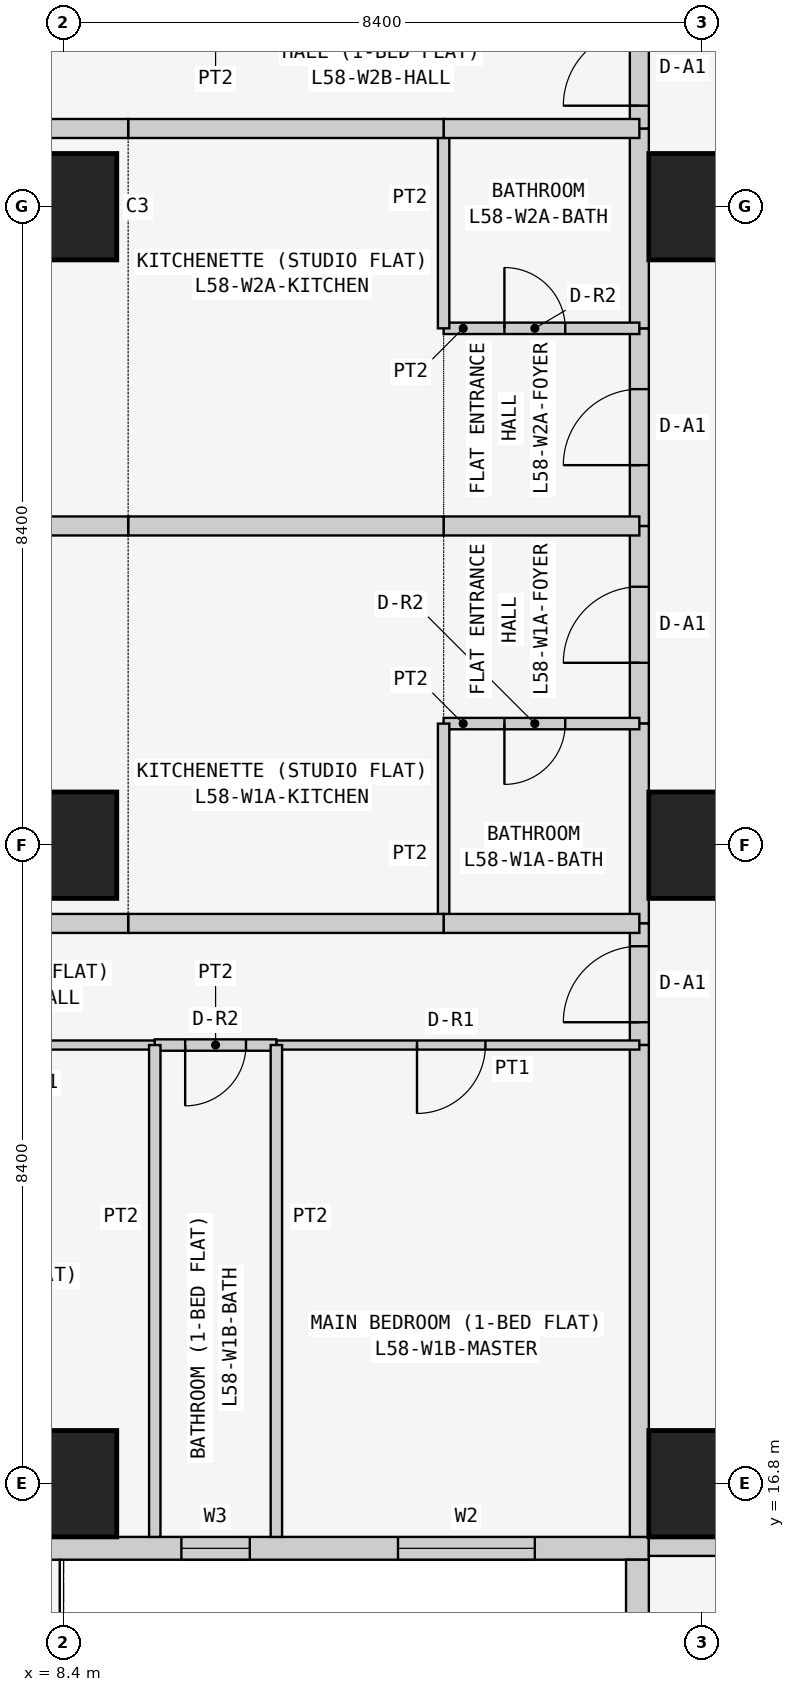
"""IFC4 building model, lengths in metres.
Left out: names, types, materials, properties, quantities, classifications, styles, units other than length and angle.
Written with IfcOpenShell. Run it as: python <this file> out.ifc"""

import sys

from ifc_helpers import new_model, si_unit, direction, frame, frame_2d, origin, origin_2d, place, context, subcontext, project, spatial, rectangle, extrude, element, fill, save


model = new_model("IFC4")
c1 = context("Model", 3, precision=1e-05, world=origin(), true_north=direction((0.0, 1.0)))
c2 = subcontext(c1, "Body", "Model", "MODEL_VIEW")
j1 = project(units=[si_unit("LENGTHUNIT", "METRE"), si_unit("PLANEANGLEUNIT", "RADIAN")], contexts=[c1])
p1 = place(None, origin())
s1 = spatial("IfcSite", under=j1, at=p1, CompositionType="ELEMENT")
p2 = place(p1, origin())
s2 = spatial("IfcBuilding", under=s1, at=p2, CompositionType="ELEMENT")
p3 = place(p2, frame((0.0, 0.0, 222.9)))
s3 = spatial("IfcBuildingStorey", under=s2, at=p3, CompositionType="ELEMENT", Elevation=222.9)
for number, where, z_axis, x_axis in (
    (1, (8.4, 16.8, 0.0), (0.0, 0.0, 1.0), (1.0, 0.0, 0.0)),
    (2, (8.4, 25.2, 0.0), (0.0, 0.0, 1.0), (1.0, 0.0, 0.0)),
    (3, (8.4, 33.6, 0.0), (0.0, 0.0, 1.0), (1.0, 0.0, 0.0)),
    (4, (16.8, 16.8, 0.0), (0.0, 0.0, 1.0), (1.0, 0.0, 0.0)),
    (5, (16.8, 25.2, 0.0), (0.0, 0.0, 1.0), (1.0, 0.0, 0.0)),
    (6, (16.8, 33.6, 0.0), (0.0, 0.0, 1.0), (1.0, 0.0, 0.0)),
):
    element("IfcColumn", number, at=place(p3, frame(where, z_axis=z_axis, x_axis=x_axis)), inside=s3, PredefinedType="COLUMN", context=c2, shape_type="SweptSolid", body=[
        extrude(rectangle(XDim=1.4, YDim=1.4, at=origin_2d()), origin(), (0.0, 0.0, 1.0), 3.6),
    ])
p4 = place(p3, frame((0.4, 15.95, 0.0), z_axis=(0.0, 0.0, 1.0), x_axis=(1.0, 0.0, 0.0)))
e7 = element("IfcWall", 7, at=p4, inside=s3, PredefinedType="SOLIDWALL", context=c2, shape_type="SweptSolid", body=[
    extrude(rectangle(XDim=15.7, YDim=0.3, at=frame_2d((7.85, 0.0))), origin(), (0.0, 0.0, 1.0), 3.45),
])
p5 = place(p4, frame((12.4, 0.0, 0.9)))
e8 = element("IfcOpeningElement", 8, at=p5, cuts=e7, PredefinedType="OPENING", context=c2, shape_type="SweptSolid", body=[
    extrude(rectangle(XDim=1.8, YDim=1.5, at=frame_2d((0.9, 0.75))), frame((0.0, 0.16, 0.0), z_axis=(0.0, -1.0, 0.0), x_axis=(1.0, 0.0, 0.0)), (0.0, 0.0, 1.0), 0.32),
])
p6 = place(p4, frame((9.55, 0.0, 1.5)))
e9 = element("IfcOpeningElement", 9, at=p6, cuts=e7, PredefinedType="OPENING", context=c2, shape_type="SweptSolid", body=[
    extrude(rectangle(XDim=0.9, YDim=0.7, at=frame_2d((0.45, 0.35))), frame((0.0, 0.16, 0.0), z_axis=(0.0, -1.0, 0.0), x_axis=(1.0, 0.0, 0.0)), (0.0, 0.0, 1.0), 0.32),
])
p7 = place(p4, frame((5.1, 0.0, 0.9)))
e10 = element("IfcOpeningElement", 10, at=p7, cuts=e7, PredefinedType="OPENING", context=c2, shape_type="SweptSolid", body=[
    extrude(rectangle(XDim=1.8, YDim=1.5, at=frame_2d((0.9, 0.75))), frame((0.0, 0.16, 0.0), z_axis=(0.0, -1.0, 0.0), x_axis=(1.0, 0.0, 0.0)), (0.0, 0.0, 1.0), 0.32),
])
p8 = place(p4, frame((2.0, 0.0, 0.0)))
e11 = element("IfcOpeningElement", 11, at=p8, cuts=e7, PredefinedType="OPENING", context=c2, shape_type="SweptSolid", body=[
    extrude(rectangle(XDim=0.9, YDim=2.4, at=frame_2d((0.45, 1.2))), frame((0.0, 0.16, 0.0), z_axis=(0.0, -1.0, 0.0), x_axis=(1.0, 0.0, 0.0)), (0.0, 0.0, 1.0), 0.32),
])
p9 = place(p4, frame((0.7, 0.0, 0.9)))
e12 = element("IfcOpeningElement", 12, at=p9, cuts=e7, PredefinedType="OPENING", context=c2, shape_type="SweptSolid", body=[
    extrude(rectangle(XDim=1.2, YDim=1.5, at=frame_2d((0.6, 0.75))), frame((0.0, 0.16, 0.0), z_axis=(0.0, -1.0, 0.0), x_axis=(1.0, 0.0, 0.0)), (0.0, 0.0, 1.0), 0.32),
])
p10 = place(p3, frame((15.95, 15.8, 0.0), z_axis=(0.0, 0.0, 1.0), x_axis=(0.0, -1.0, 0.0)))
e13 = element("IfcWall", 13, at=p10, inside=s3, PredefinedType="SOLIDWALL", context=c2, shape_type="SweptSolid", body=[
    extrude(rectangle(XDim=7.0, YDim=0.3, at=frame_2d((3.5, 0.0))), origin(), (0.0, 0.0, 1.0), 3.45),
])
p11 = place(p10, frame((1.5, 0.0, 0.9)))
e14 = element("IfcOpeningElement", 14, at=p11, cuts=e13, PredefinedType="OPENING", context=c2, shape_type="SweptSolid", body=[
    extrude(rectangle(XDim=2.4, YDim=1.5, at=frame_2d((1.2, 0.75))), frame((0.0, 0.16, 0.0), z_axis=(0.0, -1.0, 0.0), x_axis=(1.0, 0.0, 0.0)), (0.0, 0.0, 1.0), 0.32),
])
p12 = place(p10, frame((5.05, 0.0, 0.9)))
e15 = element("IfcOpeningElement", 15, at=p12, cuts=e13, PredefinedType="OPENING", context=c2, shape_type="SweptSolid", body=[
    extrude(rectangle(XDim=1.2, YDim=1.5, at=frame_2d((0.6, 0.75))), frame((0.0, 0.16, 0.0), z_axis=(0.0, -1.0, 0.0), x_axis=(1.0, 0.0, 0.0)), (0.0, 0.0, 1.0), 0.32),
])
p13 = place(p3, frame((22.971, 15.975, 0.0), z_axis=(0.0, 0.0, 1.0), x_axis=(-1.0, 0.0, 0.0)))
e16 = element("IfcWall", 16, at=p13, inside=s3, PredefinedType="PARTITIONING", context=c2, shape_type="SweptSolid", body=[
    extrude(rectangle(XDim=6.871, YDim=0.25, at=frame_2d((3.436, 0.0))), origin(), (0.0, 0.0, 1.0), 3.45),
])
p14 = place(p3, frame((15.975, 26.8, 0.0), z_axis=(0.0, 0.0, 1.0), x_axis=(0.0, 1.0, 0.0)))
e17 = element("IfcWall", 17, at=p14, inside=s3, PredefinedType="PARTITIONING", context=c2, shape_type="SweptSolid", body=[
    extrude(rectangle(XDim=2.6, YDim=0.25, at=frame_2d((1.3, 0.0))), origin(), (0.0, 0.0, 1.0), 3.45),
])
p15 = place(p14, frame((0.8, 0.0, 0.0)))
e18 = element("IfcOpeningElement", 18, at=p15, cuts=e17, PredefinedType="OPENING", context=c2, shape_type="SweptSolid", body=[
    extrude(rectangle(XDim=1.0, YDim=2.1, at=frame_2d((0.5, 1.05))), frame((0.0, 0.135, 0.0), z_axis=(0.0, -1.0, 0.0), x_axis=(1.0, 0.0, 0.0)), (0.0, 0.0, 1.0), 0.27),
])
p16 = place(p3, frame((15.975, 24.171, 0.0), z_axis=(0.0, 0.0, 1.0), x_axis=(0.0, 1.0, 0.0)))
e19 = element("IfcWall", 19, at=p16, inside=s3, PredefinedType="PARTITIONING", context=c2, shape_type="SweptSolid", body=[
    extrude(rectangle(XDim=2.629, YDim=0.25, at=frame_2d((1.314, 0.0))), origin(), (0.0, 0.0, 1.0), 3.45),
])
p17 = place(p3, frame((15.975, 22.571, 0.0), z_axis=(0.0, 0.0, 1.0), x_axis=(0.0, 1.0, 0.0)))
e20 = element("IfcWall", 20, at=p17, inside=s3, PredefinedType="PARTITIONING", context=c2, shape_type="SweptSolid", body=[
    extrude(rectangle(XDim=1.6, YDim=0.25, at=frame_2d((0.8, 0.0))), origin(), (0.0, 0.0, 1.0), 3.45),
])
p18 = place(p17, frame((0.3, 0.0, 0.0)))
e21 = element("IfcOpeningElement", 21, at=p18, cuts=e20, PredefinedType="OPENING", context=c2, shape_type="SweptSolid", body=[
    extrude(rectangle(XDim=1.0, YDim=2.1, at=frame_2d((0.5, 1.05))), frame((0.0, 0.135, 0.0), z_axis=(0.0, -1.0, 0.0), x_axis=(1.0, 0.0, 0.0)), (0.0, 0.0, 1.0), 0.27),
])
p19 = place(p3, frame((15.975, 16.1, 0.0), z_axis=(0.0, 0.0, 1.0), x_axis=(0.0, 1.0, 0.0)))
e22 = element("IfcWall", 22, at=p19, inside=s3, PredefinedType="PARTITIONING", context=c2, shape_type="SweptSolid", body=[
    extrude(rectangle(XDim=6.471, YDim=0.25, at=frame_2d((3.235, 0.0))), origin(), (0.0, 0.0, 1.0), 3.45),
])
p20 = place(p3, frame((15.975, 29.4, 0.0), z_axis=(0.0, 0.0, 1.0), x_axis=(0.0, 1.0, 0.0)))
e23 = element("IfcWall", 23, at=p20, inside=s3, PredefinedType="PARTITIONING", context=c2, shape_type="SweptSolid", body=[
    extrude(rectangle(XDim=2.6, YDim=0.25, at=frame_2d((1.3, 0.0))), origin(), (0.0, 0.0, 1.0), 3.45),
])
p21 = place(p20, frame((0.8, 0.0, 0.0)))
e24 = element("IfcOpeningElement", 24, at=p21, cuts=e23, PredefinedType="OPENING", context=c2, shape_type="SweptSolid", body=[
    extrude(rectangle(XDim=1.0, YDim=2.1, at=frame_2d((0.5, 1.05))), frame((0.0, 0.135, 0.0), z_axis=(0.0, -1.0, 0.0), x_axis=(1.0, 0.0, 0.0)), (0.0, 0.0, 1.0), 0.27),
])
p22 = place(p3, frame((15.975, 32.0, 0.0), z_axis=(0.0, 0.0, 1.0), x_axis=(0.0, 1.0, 0.0)))
e25 = element("IfcWall", 25, at=p22, inside=s3, PredefinedType="PARTITIONING", context=c2, shape_type="SweptSolid", body=[
    extrude(rectangle(XDim=2.629, YDim=0.25, at=frame_2d((1.314, 0.0))), origin(), (0.0, 0.0, 1.0), 3.45),
])
p23 = place(p3, frame((15.975, 34.629, 0.0), z_axis=(0.0, 0.0, 1.0), x_axis=(0.0, 1.0, 0.0)))
e26 = element("IfcWall", 26, at=p23, inside=s3, PredefinedType="PARTITIONING", context=c2, shape_type="SweptSolid", body=[
    extrude(rectangle(XDim=1.6, YDim=0.25, at=frame_2d((0.8, 0.0))), origin(), (0.0, 0.0, 1.0), 3.45),
])
p24 = place(p23, frame((0.3, 0.0, 0.0)))
e27 = element("IfcOpeningElement", 27, at=p24, cuts=e26, PredefinedType="OPENING", context=c2, shape_type="SweptSolid", body=[
    extrude(rectangle(XDim=1.0, YDim=2.1, at=frame_2d((0.5, 1.05))), frame((0.0, 0.135, 0.0), z_axis=(0.0, -1.0, 0.0), x_axis=(1.0, 0.0, 0.0)), (0.0, 0.0, 1.0), 0.27),
])
p25 = place(p3, frame((13.4, 26.8, 0.0), z_axis=(0.0, 0.0, 1.0), x_axis=(1.0, 0.0, 0.0)))
e28 = element("IfcWall", 28, at=p25, inside=s3, PredefinedType="PARTITIONING", context=c2, shape_type="SweptSolid", body=[
    extrude(rectangle(XDim=2.575, YDim=0.15, at=frame_2d((1.288, 0.0))), origin(), (0.0, 0.0, 1.0), 3.45),
])
p26 = place(p25, frame((0.8, 0.0, 0.0)))
e29 = element("IfcOpeningElement", 29, at=p26, cuts=e28, PredefinedType="OPENING", context=c2, shape_type="SweptSolid", body=[
    extrude(rectangle(XDim=0.8, YDim=2.1, at=frame_2d((0.4, 1.05))), frame((0.0, 0.085, 0.0), z_axis=(0.0, -1.0, 0.0), x_axis=(1.0, 0.0, 0.0)), (0.0, 0.0, 1.0), 0.17),
])
p27 = place(p3, frame((15.975, 29.4, 0.0), z_axis=(0.0, 0.0, 1.0), x_axis=(-1.0, 0.0, 0.0)))
e30 = element("IfcWall", 30, at=p27, inside=s3, PredefinedType="PARTITIONING", context=c2, shape_type="SweptSolid", body=[
    extrude(rectangle(XDim=2.575, YDim=0.25, at=frame_2d((1.288, 0.0))), origin(), (0.0, 0.0, 1.0), 3.45),
])
p28 = place(p3, frame((13.4, 26.8, 0.0), z_axis=(0.0, 0.0, 1.0), x_axis=(0.0, -1.0, 0.0)))
e31 = element("IfcWall", 31, at=p28, inside=s3, PredefinedType="PARTITIONING", context=c2, shape_type="SweptSolid", body=[
    extrude(rectangle(XDim=2.629, YDim=0.15, at=frame_2d((1.314, 0.0))), origin(), (0.0, 0.0, 1.0), 3.45),
])
p29 = place(p3, frame((13.4, 24.171, 0.0), z_axis=(0.0, 0.0, 1.0), x_axis=(1.0, 0.0, 0.0)))
e32 = element("IfcWall", 32, at=p29, inside=s3, PredefinedType="PARTITIONING", context=c2, shape_type="SweptSolid", body=[
    extrude(rectangle(XDim=2.575, YDim=0.25, at=frame_2d((1.288, 0.0))), origin(), (0.0, 0.0, 1.0), 3.45),
])
for number, where, z_axis, x_axis in (
    (33, (9.25, 24.171, 0.0), (0.0, 0.0, 1.0), (1.0, 0.0, 0.0)),
    (34, (13.4, 29.4, 0.0), (0.0, 0.0, 1.0), (-1.0, 0.0, 0.0)),
):
    element("IfcWall", number, at=place(p3, frame(where, z_axis=z_axis, x_axis=x_axis)), inside=s3, PredefinedType="PARTITIONING", context=c2, shape_type="SweptSolid", body=[
        extrude(rectangle(XDim=4.15, YDim=0.25, at=frame_2d((2.075, 0.0))), origin(), (0.0, 0.0, 1.0), 3.45),
    ])
p30 = place(p3, frame((3.5, 24.171, 0.0), z_axis=(0.0, 0.0, 1.0), x_axis=(1.0, 0.0, 0.0)))
e35 = element("IfcWall", 35, at=p30, inside=s3, PredefinedType="PARTITIONING", context=c2, shape_type="SweptSolid", body=[
    extrude(rectangle(XDim=5.75, YDim=0.25, at=frame_2d((2.875, 0.0))), origin(), (0.0, 0.0, 1.0), 3.45),
])
p31 = place(p3, frame((9.25, 29.4, 0.0), z_axis=(0.0, 0.0, 1.0), x_axis=(-1.0, 0.0, 0.0)))
e36 = element("IfcWall", 36, at=p31, inside=s3, PredefinedType="PARTITIONING", context=c2, shape_type="SweptSolid", body=[
    extrude(rectangle(XDim=9.9, YDim=0.25, at=frame_2d((4.95, 0.0))), origin(), (0.0, 0.0, 1.0), 3.45),
])
p32 = place(p3, frame((11.2, 22.571, 0.0), z_axis=(0.0, 0.0, 1.0), x_axis=(1.0, 0.0, 0.0)))
e37 = element("IfcWall", 37, at=p32, inside=s3, PredefinedType="PARTITIONING", context=c2, shape_type="SweptSolid", body=[
    extrude(rectangle(XDim=4.775, YDim=0.12, at=frame_2d((2.388, 0.0))), origin(), (0.0, 0.0, 1.0), 3.45),
])
p33 = place(p32, frame((1.85, 0.0, 0.0)))
e38 = element("IfcOpeningElement", 38, at=p33, cuts=e37, PredefinedType="OPENING", context=c2, shape_type="SweptSolid", body=[
    extrude(rectangle(XDim=0.9, YDim=2.1, at=frame_2d((0.45, 1.05))), frame((0.0, 0.07, 0.0), z_axis=(0.0, -1.0, 0.0), x_axis=(1.0, 0.0, 0.0)), (0.0, 0.0, 1.0), 0.14),
])
p34 = place(p3, frame((9.6, 22.571, 0.0), z_axis=(0.0, 0.0, 1.0), x_axis=(1.0, 0.0, 0.0)))
e39 = element("IfcWall", 39, at=p34, inside=s3, PredefinedType="PARTITIONING", context=c2, shape_type="SweptSolid", body=[
    extrude(rectangle(XDim=1.6, YDim=0.15, at=frame_2d((0.8, 0.0))), origin(), (0.0, 0.0, 1.0), 3.45),
])
p35 = place(p34, frame((0.4, 0.0, 0.0)))
e40 = element("IfcOpeningElement", 40, at=p35, cuts=e39, PredefinedType="OPENING", context=c2, shape_type="SweptSolid", body=[
    extrude(rectangle(XDim=0.8, YDim=2.1, at=frame_2d((0.4, 1.05))), frame((0.0, 0.085, 0.0), z_axis=(0.0, -1.0, 0.0), x_axis=(1.0, 0.0, 0.0)), (0.0, 0.0, 1.0), 0.17),
])
p36 = place(p3, frame((5.2, 22.571, 0.0), z_axis=(0.0, 0.0, 1.0), x_axis=(1.0, 0.0, 0.0)))
e41 = element("IfcWall", 41, at=p36, inside=s3, PredefinedType="PARTITIONING", context=c2, shape_type="SweptSolid", body=[
    extrude(rectangle(XDim=4.4, YDim=0.12, at=frame_2d((2.2, 0.0))), origin(), (0.0, 0.0, 1.0), 3.45),
])
p37 = place(p36, frame((1.55, 0.0, 0.0)))
e42 = element("IfcOpeningElement", 42, at=p37, cuts=e41, PredefinedType="OPENING", context=c2, shape_type="SweptSolid", body=[
    extrude(rectangle(XDim=0.9, YDim=2.1, at=frame_2d((0.45, 1.05))), frame((0.0, 0.07, 0.0), z_axis=(0.0, -1.0, 0.0), x_axis=(1.0, 0.0, 0.0)), (0.0, 0.0, 1.0), 0.14),
])
for number, where, z_axis, x_axis in (
    (43, (11.2, 22.571, 0.0), (0.0, 0.0, 1.0), (0.0, -1.0, 0.0)),
    (44, (9.6, 22.571, 0.0), (0.0, 0.0, 1.0), (0.0, -1.0, 0.0)),
):
    element("IfcWall", number, at=place(p3, frame(where, z_axis=z_axis, x_axis=x_axis)), inside=s3, PredefinedType="PARTITIONING", context=c2, shape_type="SweptSolid", body=[
        extrude(rectangle(XDim=6.471, YDim=0.15, at=frame_2d((3.235, 0.0))), origin(), (0.0, 0.0, 1.0), 3.45),
    ])
p38 = place(p3, frame((13.4, 32.0, 0.0), z_axis=(0.0, 0.0, 1.0), x_axis=(1.0, 0.0, 0.0)))
e45 = element("IfcWall", 45, at=p38, inside=s3, PredefinedType="PARTITIONING", context=c2, shape_type="SweptSolid", body=[
    extrude(rectangle(XDim=2.575, YDim=0.15, at=frame_2d((1.288, 0.0))), origin(), (0.0, 0.0, 1.0), 3.45),
])
p39 = place(p38, frame((0.8, 0.0, 0.0)))
e46 = element("IfcOpeningElement", 46, at=p39, cuts=e45, PredefinedType="OPENING", context=c2, shape_type="SweptSolid", body=[
    extrude(rectangle(XDim=0.8, YDim=2.1, at=frame_2d((0.4, 1.05))), frame((0.0, 0.085, 0.0), z_axis=(0.0, -1.0, 0.0), x_axis=(1.0, 0.0, 0.0)), (0.0, 0.0, 1.0), 0.17),
])
p40 = place(p3, frame((13.4, 32.0, 0.0), z_axis=(0.0, 0.0, 1.0), x_axis=(0.0, 1.0, 0.0)))
e47 = element("IfcWall", 47, at=p40, inside=s3, PredefinedType="PARTITIONING", context=c2, shape_type="SweptSolid", body=[
    extrude(rectangle(XDim=2.629, YDim=0.15, at=frame_2d((1.314, 0.0))), origin(), (0.0, 0.0, 1.0), 3.45),
])
p41 = place(p3, frame((13.4, 34.629, 0.0), z_axis=(0.0, 0.0, 1.0), x_axis=(1.0, 0.0, 0.0)))
e48 = element("IfcWall", 48, at=p41, inside=s3, PredefinedType="PARTITIONING", context=c2, shape_type="SweptSolid", body=[
    extrude(rectangle(XDim=2.575, YDim=0.25, at=frame_2d((1.288, 0.0))), origin(), (0.0, 0.0, 1.0), 3.45),
])
p42 = place(p3, frame((9.25, 34.629, 0.0), z_axis=(0.0, 0.0, 1.0), x_axis=(1.0, 0.0, 0.0)))
e49 = element("IfcWall", 49, at=p42, inside=s3, PredefinedType="PARTITIONING", context=c2, shape_type="SweptSolid", body=[
    extrude(rectangle(XDim=4.15, YDim=0.25, at=frame_2d((2.075, 0.0))), origin(), (0.0, 0.0, 1.0), 3.45),
])
p43 = place(p3, frame((3.5, 34.629, 0.0), z_axis=(0.0, 0.0, 1.0), x_axis=(1.0, 0.0, 0.0)))
e50 = element("IfcWall", 50, at=p43, inside=s3, PredefinedType="PARTITIONING", context=c2, shape_type="SweptSolid", body=[
    extrude(rectangle(XDim=5.75, YDim=0.25, at=frame_2d((2.875, 0.0))), origin(), (0.0, 0.0, 1.0), 3.45),
])
p44 = place(p5, origin())
e51 = element("IfcWindow", 51, at=p44, inside=s3, PartitioningType="SINGLE_PANEL", PredefinedType="WINDOW", context=c2, shape_type="SweptSolid", body=[
    extrude(rectangle(XDim=1.8, YDim=1.5, at=frame_2d((0.9, 0.75))), frame((0.0, 0.03, 0.0), z_axis=(0.0, -1.0, 0.0), x_axis=(1.0, 0.0, 0.0)), (0.0, 0.0, 1.0), 0.06),
])
fill(e8, e51)
p45 = place(p6, origin())
e52 = element("IfcWindow", 52, at=p45, inside=s3, PartitioningType="SINGLE_PANEL", PredefinedType="WINDOW", context=c2, shape_type="SweptSolid", body=[
    extrude(rectangle(XDim=0.9, YDim=0.7, at=frame_2d((0.45, 0.35))), frame((0.0, 0.03, 0.0), z_axis=(0.0, -1.0, 0.0), x_axis=(1.0, 0.0, 0.0)), (0.0, 0.0, 1.0), 0.06),
])
fill(e9, e52)
p46 = place(p15, origin())
e53 = element("IfcDoor", 53, at=p46, inside=s3, OperationType="SINGLE_SWING_LEFT", PredefinedType="DOOR", context=c2, shape_type="SweptSolid", body=[
    extrude(rectangle(XDim=1.0, YDim=2.1, at=frame_2d((0.5, 1.05))), frame((0.0, 0.025, 0.0), z_axis=(0.0, -1.0, 0.0), x_axis=(1.0, 0.0, 0.0)), (0.0, 0.0, 1.0), 0.05),
])
fill(e18, e53)
p47 = place(p26, frame((0.8, 0.0, 0.0), z_axis=(0.0, 0.0, 1.0), x_axis=(-1.0, 0.0, 0.0)))
e54 = element("IfcDoor", 54, at=p47, inside=s3, OperationType="SINGLE_SWING_RIGHT", PredefinedType="DOOR", context=c2, shape_type="SweptSolid", body=[
    extrude(rectangle(XDim=0.8, YDim=2.1, at=frame_2d((0.4, 1.05))), frame((0.0, 0.025, 0.0), z_axis=(0.0, -1.0, 0.0), x_axis=(1.0, 0.0, 0.0)), (0.0, 0.0, 1.0), 0.05),
])
fill(e29, e54)
p48 = place(p18, origin())
e55 = element("IfcDoor", 55, at=p48, inside=s3, OperationType="SINGLE_SWING_LEFT", PredefinedType="DOOR", context=c2, shape_type="SweptSolid", body=[
    extrude(rectangle(XDim=1.0, YDim=2.1, at=frame_2d((0.5, 1.05))), frame((0.0, 0.025, 0.0), z_axis=(0.0, -1.0, 0.0), x_axis=(1.0, 0.0, 0.0)), (0.0, 0.0, 1.0), 0.05),
])
fill(e21, e55)
p49 = place(p33, frame((0.9, 0.0, 0.0), z_axis=(0.0, 0.0, 1.0), x_axis=(-1.0, 0.0, 0.0)))
e56 = element("IfcDoor", 56, at=p49, inside=s3, OperationType="SINGLE_SWING_RIGHT", PredefinedType="DOOR", context=c2, shape_type="SweptSolid", body=[
    extrude(rectangle(XDim=0.9, YDim=2.1, at=frame_2d((0.45, 1.05))), frame((0.0, 0.025, 0.0), z_axis=(0.0, -1.0, 0.0), x_axis=(1.0, 0.0, 0.0)), (0.0, 0.0, 1.0), 0.05),
])
fill(e38, e56)
p50 = place(p35, frame((0.8, 0.0, 0.0), z_axis=(0.0, 0.0, 1.0), x_axis=(-1.0, 0.0, 0.0)))
e57 = element("IfcDoor", 57, at=p50, inside=s3, OperationType="SINGLE_SWING_RIGHT", PredefinedType="DOOR", context=c2, shape_type="SweptSolid", body=[
    extrude(rectangle(XDim=0.8, YDim=2.1, at=frame_2d((0.4, 1.05))), frame((0.0, 0.025, 0.0), z_axis=(0.0, -1.0, 0.0), x_axis=(1.0, 0.0, 0.0)), (0.0, 0.0, 1.0), 0.05),
])
fill(e40, e57)
p51 = place(p21, origin())
e58 = element("IfcDoor", 58, at=p51, inside=s3, OperationType="SINGLE_SWING_LEFT", PredefinedType="DOOR", context=c2, shape_type="SweptSolid", body=[
    extrude(rectangle(XDim=1.0, YDim=2.1, at=frame_2d((0.5, 1.05))), frame((0.0, 0.025, 0.0), z_axis=(0.0, -1.0, 0.0), x_axis=(1.0, 0.0, 0.0)), (0.0, 0.0, 1.0), 0.05),
])
fill(e24, e58)
p52 = place(p39, origin())
e59 = element("IfcDoor", 59, at=p52, inside=s3, OperationType="SINGLE_SWING_LEFT", PredefinedType="DOOR", context=c2, shape_type="SweptSolid", body=[
    extrude(rectangle(XDim=0.8, YDim=2.1, at=frame_2d((0.4, 1.05))), frame((0.0, 0.025, 0.0), z_axis=(0.0, -1.0, 0.0), x_axis=(1.0, 0.0, 0.0)), (0.0, 0.0, 1.0), 0.05),
])
fill(e46, e59)
p53 = place(p24, origin())
e60 = element("IfcDoor", 60, at=p53, inside=s3, OperationType="SINGLE_SWING_LEFT", PredefinedType="DOOR", context=c2, shape_type="SweptSolid", body=[
    extrude(rectangle(XDim=1.0, YDim=2.1, at=frame_2d((0.5, 1.05))), frame((0.0, 0.025, 0.0), z_axis=(0.0, -1.0, 0.0), x_axis=(1.0, 0.0, 0.0)), (0.0, 0.0, 1.0), 0.05),
])
fill(e27, e60)
save(model, sys.argv[1])
